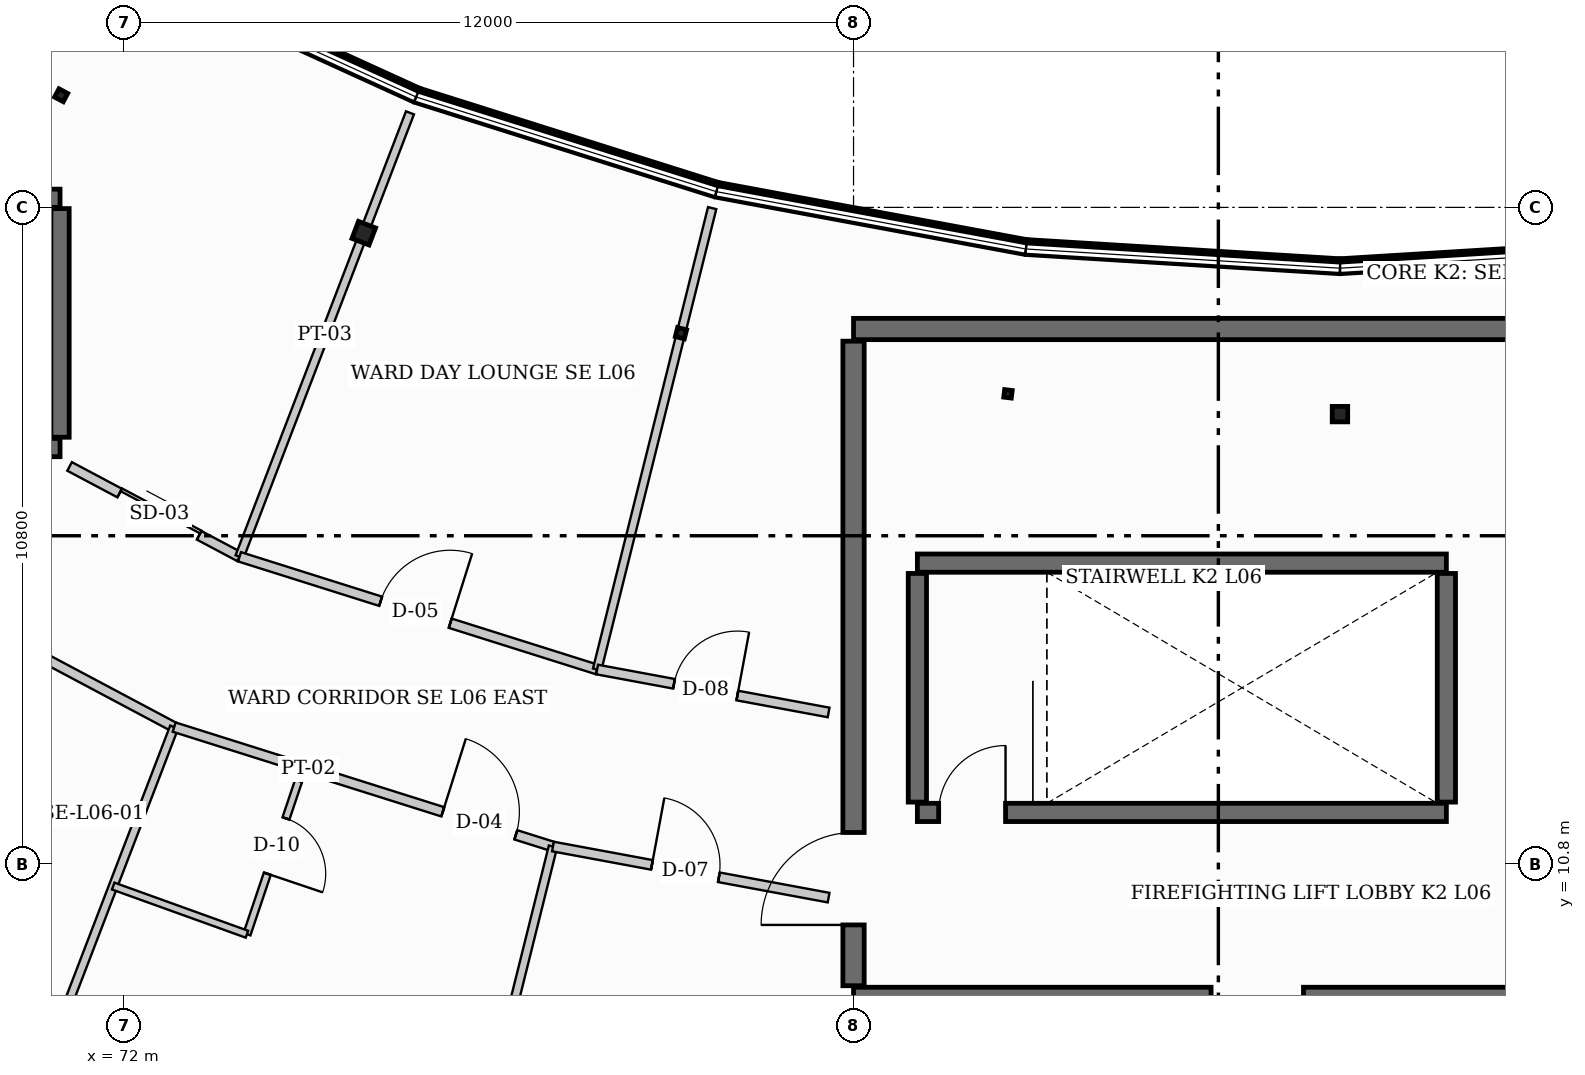
"""IFC4 building model, lengths in metres.
Left out: names, types, materials, properties, quantities, classifications, styles, units other than length and angle.
Written with IfcOpenShell. Run it as: python <this file> out.ifc"""

import sys

from ifc_helpers import new_model, si_unit, direction, frame, frame_2d, origin, origin_2d, place, context, subcontext, project, spatial, rectangle, hollow_rectangle, i_section, extrude, element, fill, save


model = new_model("IFC4")
c1 = context("Model", 3, precision=1e-05, world=origin(), true_north=direction((0.0, 1.0)))
c2 = subcontext(c1, "Body", "Model", "MODEL_VIEW")
j1 = project(units=[si_unit("LENGTHUNIT", "METRE"), si_unit("PLANEANGLEUNIT", "RADIAN")], contexts=[c1])
p1 = place(None, origin())
s1 = spatial("IfcSite", under=j1, at=p1, CompositionType="ELEMENT")
p2 = place(p1, origin())
s2 = spatial("IfcBuilding", under=s1, at=p2, CompositionType="ELEMENT")
p3 = place(p2, frame((0.0, 0.0, 26.1)))
s3 = spatial("IfcBuildingStorey", under=s2, at=p3, CompositionType="ELEMENT", Elevation=26.1)
p4 = place(p3, frame((70.968, 23.444, 0.0), z_axis=(0.0, 0.0, 1.0), x_axis=(0.469471562786, 0.882947592859, 0.0)))
e1 = element("IfcColumn", 1, at=p4, inside=s3, PredefinedType="COLUMN", context=c2, shape_type="SweptSolid", body=[
    extrude(i_section(OverallWidth=0.154, OverallDepth=0.162, WebThickness=0.008, FlangeThickness=0.011, at=origin_2d()), origin(), (0.0, 0.0, 1.0), 3.9),
])
p5 = place(p3, frame((75.945, 21.176, 0.0), z_axis=(0.0, 0.0, 1.0), x_axis=(0.358367949545, 0.933580426497, 0.0)))
e2 = element("IfcColumn", 2, at=p5, inside=s3, PredefinedType="COLUMN", context=c2, shape_type="SweptSolid", body=[
    extrude(hollow_rectangle(XDim=0.3, YDim=0.3, WallThickness=0.012, at=origin_2d()), origin(), (0.0, 0.0, 1.0), 3.9),
])
p6 = place(p3, frame((81.162, 19.531, 0.0), z_axis=(0.0, 0.0, 1.0), x_axis=(0.2419218956, 0.970295726276, 0.0)))
e3 = element("IfcColumn", 3, at=p6, inside=s3, PredefinedType="COLUMN", context=c2, shape_type="SweptSolid", body=[
    extrude(i_section(OverallWidth=0.152, OverallDepth=0.152, WebThickness=0.006, FlangeThickness=0.007, at=origin_2d()), origin(), (0.0, 0.0, 1.0), 3.9),
])
p7 = place(p3, frame((86.54, 18.534, 0.0), z_axis=(0.0, 0.0, 1.0), x_axis=(0.121869343405, 0.992546151641, 0.0)))
e4 = element("IfcColumn", 4, at=p7, inside=s3, PredefinedType="COLUMN", context=c2, shape_type="SweptSolid", body=[
    extrude(hollow_rectangle(XDim=0.125, YDim=0.125, WallThickness=0.006, at=origin_2d()), origin(), (0.0, 0.0, 1.0), 3.9),
])
p8 = place(p3, frame((92.0, 18.2, 0.0), z_axis=(0.0, 0.0, 1.0), x_axis=(0.0, 1.0, 0.0)))
e5 = element("IfcColumn", 5, at=p8, inside=s3, PredefinedType="COLUMN", context=c2, shape_type="SweptSolid", body=[
    extrude(i_section(OverallWidth=0.254, OverallDepth=0.254, WebThickness=0.009, FlangeThickness=0.014, at=origin_2d()), origin(), (0.0, 0.0, 1.0), 3.9),
])
p9 = place(p3, frame((84.0, 19.6, 0.0), z_axis=(0.0, 0.0, 1.0), x_axis=(1.0, 0.0, 0.0)))
e6 = element("IfcWall", 6, at=p9, inside=s3, PredefinedType="SHEAR", context=c2, shape_type="SweptSolid", body=[
    extrude(rectangle(XDim=20.4, YDim=0.35, at=frame_2d((10.2, 0.0))), origin(), (0.0, 0.0, 1.0), 3.9),
])
p10 = place(p3, frame((104.4, 8.6, 0.0), z_axis=(0.0, 0.0, 1.0), x_axis=(-1.0, 0.0, 0.0)))
e7 = element("IfcWall", 7, at=p10, inside=s3, PredefinedType="SHEAR", context=c2, shape_type="SweptSolid", body=[
    extrude(rectangle(XDim=20.4, YDim=0.35, at=frame_2d((10.2, 0.0))), origin(), (0.0, 0.0, 1.0), 3.9),
])
p11 = place(p10, frame((2.2, 0.0, 0.0)))
e8 = element("IfcOpeningElement", 8, at=p11, cuts=e7, PredefinedType="OPENING", context=c2, shape_type="SweptSolid", body=[
    extrude(rectangle(XDim=1.64, YDim=2.2, at=frame_2d((0.82, 1.1))), frame((0.0, 0.185, 0.0), z_axis=(0.0, -1.0, 0.0), x_axis=(1.0, 0.0, 0.0)), (0.0, 0.0, 1.0), 0.37),
])
p12 = place(p10, frame((13.0, 0.0, 0.0)))
e9 = element("IfcOpeningElement", 9, at=p12, cuts=e7, PredefinedType="OPENING", context=c2, shape_type="SweptSolid", body=[
    extrude(rectangle(XDim=1.52, YDim=2.16, at=frame_2d((0.76, 1.08))), frame((0.0, 0.185, 0.0), z_axis=(0.0, -1.0, 0.0), x_axis=(1.0, 0.0, 0.0)), (0.0, 0.0, 1.0), 0.37),
])
p13 = place(p3, frame((84.0, 8.8, 0.0), z_axis=(0.0, 0.0, 1.0), x_axis=(0.0, 1.0, 0.0)))
e10 = element("IfcWall", 10, at=p13, inside=s3, PredefinedType="SHEAR", context=c2, shape_type="SweptSolid", body=[
    extrude(rectangle(XDim=10.6, YDim=0.35, at=frame_2d((5.3, 0.0))), origin(), (0.0, 0.0, 1.0), 3.9),
])
p14 = place(p13, frame((1.0, 0.0, 0.0)))
e11 = element("IfcOpeningElement", 11, at=p14, cuts=e10, PredefinedType="OPENING", context=c2, shape_type="SweptSolid", body=[
    extrude(rectangle(XDim=1.52, YDim=2.16, at=frame_2d((0.76, 1.08))), frame((0.0, 0.185, 0.0), z_axis=(0.0, -1.0, 0.0), x_axis=(1.0, 0.0, 0.0)), (0.0, 0.0, 1.0), 0.37),
])
p15 = place(p3, frame((85.05, 11.65, 0.0), z_axis=(0.0, 0.0, 1.0), x_axis=(1.0, 0.0, 0.0)))
e12 = element("IfcWall", 12, at=p15, inside=s3, PredefinedType="SHEAR", context=c2, shape_type="SweptSolid", body=[
    extrude(rectangle(XDim=8.7, YDim=0.3, at=frame_2d((4.35, 0.0))), origin(), (0.0, 0.0, 1.0), 3.9),
])
p16 = place(p15, frame((0.35, 0.0, 0.0)))
e13 = element("IfcOpeningElement", 13, at=p16, cuts=e12, PredefinedType="OPENING", context=c2, shape_type="SweptSolid", body=[
    extrude(rectangle(XDim=1.1, YDim=2.15, at=frame_2d((0.55, 1.075))), frame((0.0, 0.16, 0.0), z_axis=(0.0, -1.0, 0.0), x_axis=(1.0, 0.0, 0.0)), (0.0, 0.0, 1.0), 0.32),
])
p17 = place(p3, frame((93.75, 15.75, 0.0), z_axis=(0.0, 0.0, 1.0), x_axis=(-1.0, 0.0, 0.0)))
e14 = element("IfcWall", 14, at=p17, inside=s3, PredefinedType="SHEAR", context=c2, shape_type="SweptSolid", body=[
    extrude(rectangle(XDim=8.7, YDim=0.3, at=frame_2d((4.35, 0.0))), origin(), (0.0, 0.0, 1.0), 3.9),
])
for number, where, z_axis, x_axis in (
    (15, (85.05, 11.82, 0.0), (0.0, 0.0, 1.0), (0.0, 1.0, 0.0)),
    (16, (93.75, 11.82, 0.0), (0.0, 0.0, 1.0), (0.0, 1.0, 0.0)),
):
    element("IfcWall", number, at=place(p3, frame(where, z_axis=z_axis, x_axis=x_axis)), inside=s3, PredefinedType="SHEAR", context=c2, shape_type="SweptSolid", body=[
        extrude(rectangle(XDim=3.76, YDim=0.3, at=frame_2d((1.88, 0.0))), origin(), (0.0, 0.0, 1.0), 3.9),
    ])
p18 = place(p3, frame((62.25, 17.65, 0.0), z_axis=(0.0, 0.0, 1.0), x_axis=(1.0, 0.0, 0.0)))
e17 = element("IfcWall", 17, at=p18, inside=s3, PredefinedType="SHEAR", context=c2, shape_type="SweptSolid", body=[
    extrude(rectangle(XDim=8.7, YDim=0.3, at=frame_2d((4.35, 0.0))), origin(), (0.0, 0.0, 1.0), 3.9),
])
p19 = place(p18, frame((0.35, 0.0, 0.0)))
e18 = element("IfcOpeningElement", 18, at=p19, cuts=e17, PredefinedType="OPENING", context=c2, shape_type="SweptSolid", body=[
    extrude(rectangle(XDim=1.1, YDim=2.15, at=frame_2d((0.55, 1.075))), frame((0.0, 0.16, 0.0), z_axis=(0.0, -1.0, 0.0), x_axis=(1.0, 0.0, 0.0)), (0.0, 0.0, 1.0), 0.32),
])
p20 = place(p3, frame((70.95, 21.75, 0.0), z_axis=(0.0, 0.0, 1.0), x_axis=(-1.0, 0.0, 0.0)))
e19 = element("IfcWall", 19, at=p20, inside=s3, PredefinedType="SHEAR", context=c2, shape_type="SweptSolid", body=[
    extrude(rectangle(XDim=8.7, YDim=0.3, at=frame_2d((4.35, 0.0))), origin(), (0.0, 0.0, 1.0), 3.9),
])
p21 = place(p3, frame((70.95, 17.82, 0.0), z_axis=(0.0, 0.0, 1.0), x_axis=(0.0, 1.0, 0.0)))
e20 = element("IfcWall", 20, at=p21, inside=s3, PredefinedType="SHEAR", context=c2, shape_type="SweptSolid", body=[
    extrude(rectangle(XDim=3.76, YDim=0.3, at=frame_2d((1.88, 0.0))), origin(), (0.0, 0.0, 1.0), 3.9),
])
for number, where, z_axis, x_axis in (
    (21, (92.0, 20.6, 0.0), (0.0, 0.0, 1.0), (0.998, 0.061, 0.0)),
    (22, (86.833, 20.916, 0.0), (0.0, 0.0, 1.0), (0.998, -0.061, 0.0)),
    (23, (81.743, 21.859, 0.0), (0.0, 0.0, 1.0), (0.983, -0.182, 0.0)),
):
    element("IfcWall", number, at=place(p3, frame(where, z_axis=z_axis, x_axis=x_axis)), inside=s3, PredefinedType="STANDARD", context=c2, shape_type="SweptSolid", body=[
        extrude(rectangle(XDim=5.177, YDim=0.22, at=frame_2d((2.588, 0.0))), origin(), (0.0, 0.0, 1.0), 1.05),
    ])
p22 = place(p3, frame((76.805, 23.416, 0.0), z_axis=(0.0, 0.0, 1.0), x_axis=(0.953706582316, -0.300738681994, 0.0)))
e24 = element("IfcWall", 24, at=p22, inside=s3, PredefinedType="STANDARD", context=c2, shape_type="SweptSolid", body=[
    extrude(rectangle(XDim=5.178, YDim=0.22, at=frame_2d((2.589, 0.0))), origin(), (0.0, 0.0, 1.0), 1.05),
])
p23 = place(p3, frame((72.094, 25.563, 0.0), z_axis=(0.0, 0.0, 1.0), x_axis=(0.909955822384, -0.414705198074, 0.0)))
e25 = element("IfcWall", 25, at=p23, inside=s3, PredefinedType="STANDARD", context=c2, shape_type="SweptSolid", body=[
    extrude(rectangle(XDim=5.177, YDim=0.22, at=frame_2d((2.588, 0.0))), origin(), (0.0, 0.0, 1.0), 1.05),
])
p24 = place(p3, frame((64.765, 17.34, 0.0), z_axis=(0.0, 0.0, 1.0), x_axis=(0.882926631997, -0.469510982311, 0.0)))
e26 = element("IfcWall", 26, at=p24, inside=s3, PredefinedType="PARTITIONING", context=c2, shape_type="SweptSolid", body=[
    extrude(rectangle(XDim=9.131, YDim=0.16, at=frame_2d((4.565, 0.0))), origin(), (0.0, 0.0, 1.0), 3.273),
])
p25 = place(p24, frame((3.916, 0.0, 0.0)))
e27 = element("IfcOpeningElement", 27, at=p25, cuts=e26, PredefinedType="OPENING", context=c2, shape_type="SweptSolid", body=[
    extrude(rectangle(XDim=1.62, YDim=2.3, at=frame_2d((0.81, 1.15))), frame((0.0, 0.09, 0.0), z_axis=(0.0, -1.0, 0.0), x_axis=(1.0, 0.0, 0.0)), (0.0, 0.0, 1.0), 0.18),
])
p26 = place(p3, frame((72.827, 13.053, 0.0), z_axis=(0.0, 0.0, 1.0), x_axis=(-0.358342954102, -0.933590020965, 0.0)))
e28 = element("IfcWall", 28, at=p26, inside=s3, PredefinedType="PARTITIONING", context=c2, shape_type="SweptSolid", body=[
    extrude(rectangle(XDim=7.819, YDim=0.14, at=frame_2d((3.91, 0.0))), origin(), (0.0, 0.0, 1.0), 3.273),
])
p27 = place(p3, frame((71.107, 17.34, 0.0), z_axis=(0.0, 0.0, 1.0), x_axis=(0.882964896182, -0.469439018522, 0.0)))
e29 = element("IfcWall", 29, at=p27, inside=s3, PredefinedType="PARTITIONING", context=c2, shape_type="SweptSolid", body=[
    extrude(rectangle(XDim=3.166, YDim=0.16, at=frame_2d((1.583, 0.0))), origin(), (0.0, 0.0, 1.0), 3.273),
])
p28 = place(p27, frame((0.933, 0.0, 0.0)))
e30 = element("IfcOpeningElement", 30, at=p28, cuts=e29, PredefinedType="OPENING", context=c2, shape_type="SweptSolid", body=[
    extrude(rectangle(XDim=1.48, YDim=2.26, at=frame_2d((0.74, 1.13))), frame((0.0, 0.09, 0.0), z_axis=(0.0, -1.0, 0.0), x_axis=(1.0, 0.0, 0.0)), (0.0, 0.0, 1.0), 0.18),
])
p29 = place(p3, frame((73.902, 15.854, 0.0), z_axis=(0.0, 0.0, 1.0), x_axis=(0.358410014332, 0.933564278251, 0.0)))
e31 = element("IfcWall", 31, at=p29, inside=s3, PredefinedType="PARTITIONING", context=c2, shape_type="SweptSolid", body=[
    extrude(rectangle(XDim=7.821, YDim=0.14, at=frame_2d((3.91, 0.0))), origin(), (0.0, 0.0, 1.0), 3.273),
])
p30 = place(p3, frame((74.873, 12.168, 0.0), z_axis=(0.0, 0.0, 1.0), x_axis=(-0.319199781595, -0.947687448176, 0.0)))
e32 = element("IfcWall", 32, at=p30, inside=s3, PredefinedType="PARTITIONING", context=c2, shape_type="SweptSolid", body=[
    extrude(rectangle(XDim=2.66, YDim=0.12, at=frame_2d((1.33, 0.0))), origin(), (0.0, 0.0, 1.0), 3.529),
])
p31 = place(p30, frame((0.65, 0.0, 0.0)))
e33 = element("IfcOpeningElement", 33, at=p31, cuts=e32, PredefinedType="OPENING", context=c2, shape_type="SweptSolid", body=[
    extrude(rectangle(XDim=0.96, YDim=2.06, at=frame_2d((0.48, 1.03))), frame((0.0, 0.07, 0.0), z_axis=(0.0, -1.0, 0.0), x_axis=(1.0, 0.0, 0.0)), (0.0, 0.0, 1.0), 0.14),
])
p32 = place(p3, frame((71.824, 10.439, 0.0), z_axis=(0.0, 0.0, 1.0), x_axis=(0.940886080788, -0.338723165695, 0.0)))
e34 = element("IfcWall", 34, at=p32, inside=s3, PredefinedType="PARTITIONING", context=c2, shape_type="SweptSolid", body=[
    extrude(rectangle(XDim=2.338, YDim=0.12, at=frame_2d((1.169, 0.0))), origin(), (0.0, 0.0, 1.0), 3.273),
])
p33 = place(p3, frame((72.827, 13.053, 0.0), z_axis=(0.0, 0.0, 1.0), x_axis=(0.953736183483, -0.30064479426, 0.0)))
e35 = element("IfcWall", 35, at=p33, inside=s3, PredefinedType="PARTITIONING", context=c2, shape_type="SweptSolid", body=[
    extrude(rectangle(XDim=6.532, YDim=0.16, at=frame_2d((3.266, 0.0))), origin(), (0.0, 0.0, 1.0), 3.273),
])
p34 = place(p33, frame((4.632, 0.0, 0.0)))
e36 = element("IfcOpeningElement", 36, at=p34, cuts=e35, PredefinedType="OPENING", context=c2, shape_type="SweptSolid", body=[
    extrude(rectangle(XDim=1.26, YDim=2.14, at=frame_2d((0.63, 1.07))), frame((0.0, 0.09, 0.0), z_axis=(0.0, -1.0, 0.0), x_axis=(1.0, 0.0, 0.0)), (0.0, 0.0, 1.0), 0.18),
])
p35 = place(p3, frame((79.057, 11.089, 0.0), z_axis=(0.0, 0.0, 1.0), x_axis=(-0.241911207257, -0.970298391117, 0.0)))
e37 = element("IfcWall", 37, at=p35, inside=s3, PredefinedType="PARTITIONING", context=c2, shape_type="SweptSolid", body=[
    extrude(rectangle(XDim=7.82, YDim=0.14, at=frame_2d((3.91, 0.0))), origin(), (0.0, 0.0, 1.0), 3.278),
])
p36 = place(p3, frame((73.902, 15.854, 0.0), z_axis=(0.0, 0.0, 1.0), x_axis=(0.953727365227, -0.300672767002, 0.0)))
e38 = element("IfcWall", 38, at=p36, inside=s3, PredefinedType="PARTITIONING", context=c2, shape_type="SweptSolid", body=[
    extrude(rectangle(XDim=6.166, YDim=0.16, at=frame_2d((3.083, 0.0))), origin(), (0.0, 0.0, 1.0), 3.273),
])
p37 = place(p36, frame((2.433, 0.0, 0.0)))
e39 = element("IfcOpeningElement", 39, at=p37, cuts=e38, PredefinedType="OPENING", context=c2, shape_type="SweptSolid", body=[
    extrude(rectangle(XDim=1.2, YDim=2.12, at=frame_2d((0.6, 1.06))), frame((0.0, 0.09, 0.0), z_axis=(0.0, -1.0, 0.0), x_axis=(1.0, 0.0, 0.0)), (0.0, 0.0, 1.0), 0.18),
])
p38 = place(p3, frame((79.783, 14.0, 0.0), z_axis=(0.0, 0.0, 1.0), x_axis=(0.241947927131, 0.970289235515, 0.0)))
e40 = element("IfcWall", 40, at=p38, inside=s3, PredefinedType="PARTITIONING", context=c2, shape_type="SweptSolid", body=[
    extrude(rectangle(XDim=7.82, YDim=0.14, at=frame_2d((3.91, 0.0))), origin(), (0.0, 0.0, 1.0), 3.278),
])
p39 = place(p3, frame((79.057, 11.089, 0.0), z_axis=(0.0, 0.0, 1.0), x_axis=(0.983258469263, -0.182216307235, 0.0)))
e41 = element("IfcWall", 41, at=p39, inside=s3, PredefinedType="PARTITIONING", context=c2, shape_type="SweptSolid", body=[
    extrude(rectangle(XDim=4.61, YDim=0.16, at=frame_2d((2.305, 0.0))), origin(), (0.0, 0.0, 1.0), 3.278),
])
p40 = place(p39, frame((1.655, 0.0, 0.0)))
e42 = element("IfcOpeningElement", 42, at=p40, cuts=e41, PredefinedType="OPENING", context=c2, shape_type="SweptSolid", body=[
    extrude(rectangle(XDim=1.12, YDim=2.08, at=frame_2d((0.56, 1.04))), frame((0.0, 0.09, 0.0), z_axis=(0.0, -1.0, 0.0), x_axis=(1.0, 0.0, 0.0)), (0.0, 0.0, 1.0), 0.18),
])
p41 = place(p3, frame((79.783, 14.0, 0.0), z_axis=(0.0, 0.0, 1.0), x_axis=(0.983234305922, -0.182346646962, 0.0)))
e43 = element("IfcWall", 43, at=p41, inside=s3, PredefinedType="PARTITIONING", context=c2, shape_type="SweptSolid", body=[
    extrude(rectangle(XDim=3.872, YDim=0.16, at=frame_2d((1.936, 0.0))), origin(), (0.0, 0.0, 1.0), 3.278),
])
p42 = place(p41, frame((1.286, 0.0, 0.0)))
e44 = element("IfcOpeningElement", 44, at=p42, cuts=e43, PredefinedType="OPENING", context=c2, shape_type="SweptSolid", body=[
    extrude(rectangle(XDim=1.06, YDim=2.1, at=frame_2d((0.53, 1.05))), frame((0.0, 0.09, 0.0), z_axis=(0.0, -1.0, 0.0), x_axis=(1.0, 0.0, 0.0)), (0.0, 0.0, 1.0), 0.18),
])
p43 = place(p16, origin())
e45 = element("IfcDoor", 45, at=p43, inside=s3, OperationType="SINGLE_SWING_RIGHT", PredefinedType="DOOR", context=c2, shape_type="SweptSolid", body=[
    extrude(rectangle(XDim=1.1, YDim=2.15, at=frame_2d((0.55, 1.075))), frame((0.0, 0.025, 0.0), z_axis=(0.0, -1.0, 0.0), x_axis=(1.0, 0.0, 0.0)), (0.0, 0.0, 1.0), 0.05),
])
fill(e13, e45)
p44 = place(p14, origin())
e46 = element("IfcDoor", 46, at=p44, inside=s3, OperationType="SINGLE_SWING_LEFT", PredefinedType="DOOR", context=c2, shape_type="SweptSolid", body=[
    extrude(rectangle(XDim=1.52, YDim=2.16, at=frame_2d((0.76, 1.08))), frame((0.0, 0.025, 0.0), z_axis=(0.0, -1.0, 0.0), x_axis=(1.0, 0.0, 0.0)), (0.0, 0.0, 1.0), 0.05),
])
fill(e11, e46)
p45 = place(p28, origin())
e47 = element("IfcDoor", 47, at=p45, inside=s3, OperationType="SLIDING_TO_LEFT", PredefinedType="DOOR", context=c2, shape_type="SweptSolid", body=[
    extrude(rectangle(XDim=1.48, YDim=2.26, at=frame_2d((0.74, 1.13))), frame((0.0, 0.025, 0.0), z_axis=(0.0, -1.0, 0.0), x_axis=(1.0, 0.0, 0.0)), (0.0, 0.0, 1.0), 0.05),
])
fill(e30, e47)
p46 = place(p31, origin())
e48 = element("IfcDoor", 48, at=p46, inside=s3, OperationType="SINGLE_SWING_RIGHT", PredefinedType="DOOR", context=c2, shape_type="SweptSolid", body=[
    extrude(rectangle(XDim=0.96, YDim=2.06, at=frame_2d((0.48, 1.03))), frame((0.0, 0.025, 0.0), z_axis=(0.0, -1.0, 0.0), x_axis=(1.0, 0.0, 0.0)), (0.0, 0.0, 1.0), 0.05),
])
fill(e33, e48)
p47 = place(p34, origin())
e49 = element("IfcDoor", 49, at=p47, inside=s3, OperationType="SINGLE_SWING_LEFT", PredefinedType="DOOR", context=c2, shape_type="SweptSolid", body=[
    extrude(rectangle(XDim=1.26, YDim=2.14, at=frame_2d((0.63, 1.07))), frame((0.0, 0.025, 0.0), z_axis=(0.0, -1.0, 0.0), x_axis=(1.0, 0.0, 0.0)), (0.0, 0.0, 1.0), 0.05),
])
fill(e36, e49)
p48 = place(p37, origin())
e50 = element("IfcDoor", 50, at=p48, inside=s3, OperationType="SINGLE_SWING_RIGHT", PredefinedType="DOOR", context=c2, shape_type="SweptSolid", body=[
    extrude(rectangle(XDim=1.2, YDim=2.12, at=frame_2d((0.6, 1.06))), frame((0.0, 0.025, 0.0), z_axis=(0.0, -1.0, 0.0), x_axis=(1.0, 0.0, 0.0)), (0.0, 0.0, 1.0), 0.05),
])
fill(e39, e50)
p49 = place(p40, origin())
e51 = element("IfcDoor", 51, at=p49, inside=s3, OperationType="SINGLE_SWING_LEFT", PredefinedType="DOOR", context=c2, shape_type="SweptSolid", body=[
    extrude(rectangle(XDim=1.12, YDim=2.08, at=frame_2d((0.56, 1.04))), frame((0.0, 0.025, 0.0), z_axis=(0.0, -1.0, 0.0), x_axis=(1.0, 0.0, 0.0)), (0.0, 0.0, 1.0), 0.05),
])
fill(e42, e51)
p50 = place(p42, origin())
e52 = element("IfcDoor", 52, at=p50, inside=s3, OperationType="SINGLE_SWING_RIGHT", PredefinedType="DOOR", context=c2, shape_type="SweptSolid", body=[
    extrude(rectangle(XDim=1.06, YDim=2.1, at=frame_2d((0.53, 1.05))), frame((0.0, 0.025, 0.0), z_axis=(0.0, -1.0, 0.0), x_axis=(1.0, 0.0, 0.0)), (0.0, 0.0, 1.0), 0.05),
])
fill(e44, e52)
save(model, sys.argv[1])
